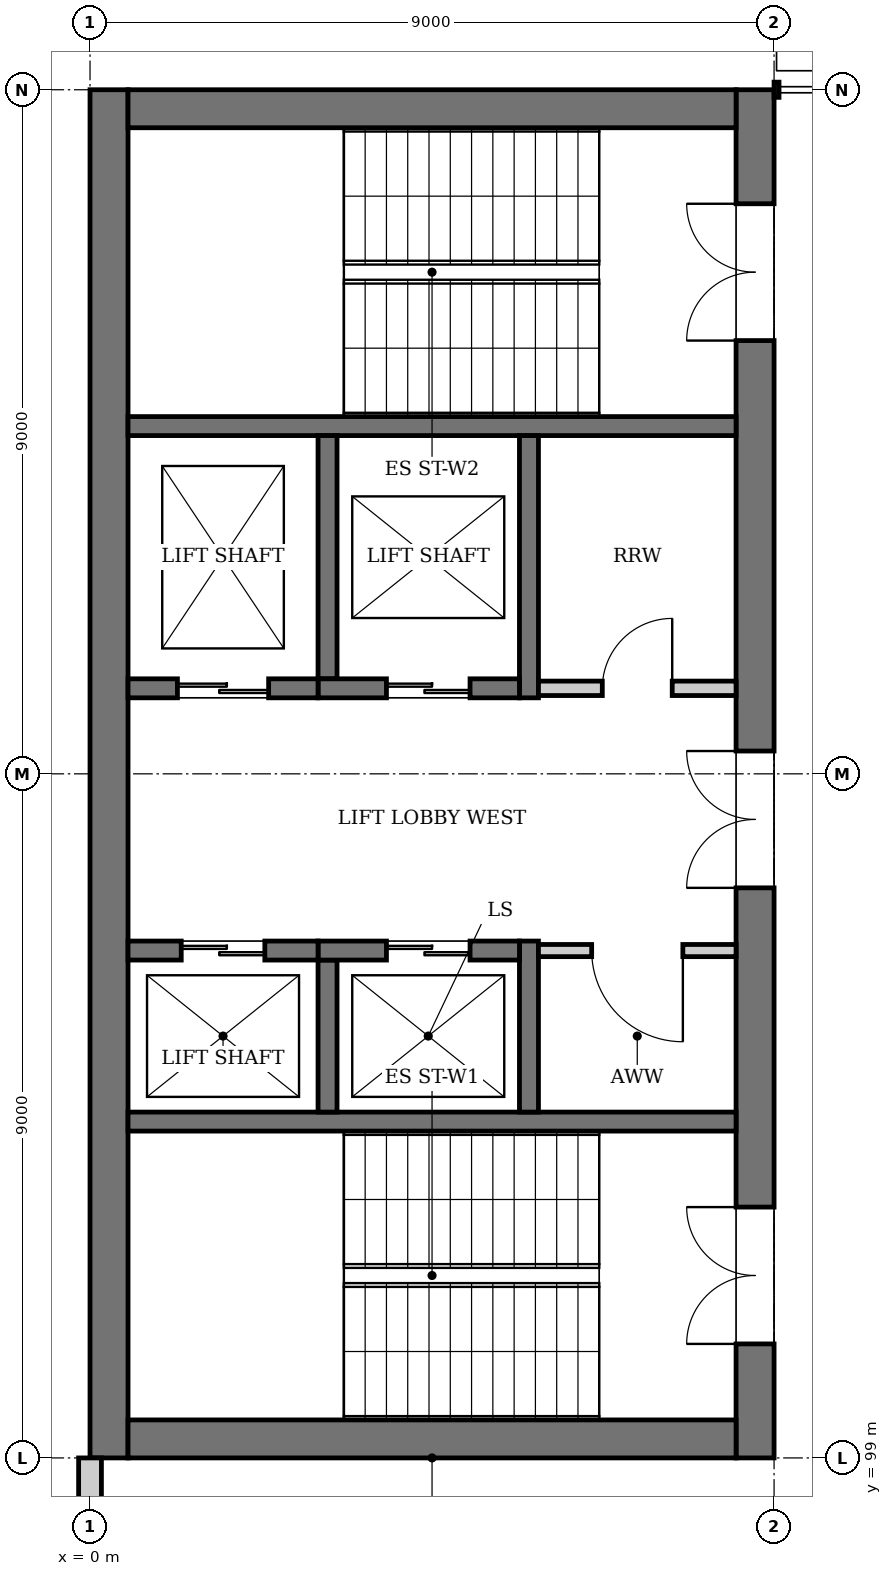
"""IFC4 building model, lengths in metres.
Left out: names, types, materials, properties, quantities, classifications, styles, units other than length and angle.
Written with IfcOpenShell. Run it as: python <this file> out.ifc"""

import sys

from ifc_helpers import new_model, si_unit, direction, frame, frame_2d, origin, place, context, subcontext, project, spatial, rectangle, extrude, element, fill, save


model = new_model("IFC4")
c1 = context("Model", 3, precision=1e-05, world=origin(), true_north=direction((0.0, 1.0)))
c2 = subcontext(c1, "Body", "Model", "MODEL_VIEW")
j1 = project(units=[si_unit("LENGTHUNIT", "METRE"), si_unit("PLANEANGLEUNIT", "RADIAN")], contexts=[c1])
p1 = place(None, origin())
s1 = spatial("IfcSite", under=j1, at=p1, CompositionType="ELEMENT")
p2 = place(p1, origin())
s2 = spatial("IfcBuilding", under=s1, at=p2, CompositionType="ELEMENT")
p3 = place(p2, frame((0.0, 0.0, 6.0)))
s3 = spatial("IfcBuildingStorey", under=s2, at=p3, CompositionType="ELEMENT", Elevation=6.0)
p4 = place(p3, frame((0.25, 99.0, 0.0), z_axis=(0.0, 0.0, 1.0), x_axis=(0.0, 1.0, 0.0)))
e1 = element("IfcWall", 1, at=p4, inside=s3, PredefinedType="SHEAR", context=c2, shape_type="SweptSolid", body=[
    extrude(rectangle(XDim=18.0, YDim=0.5, at=frame_2d((9.0, 0.0))), origin(), (0.0, 0.0, 1.0), 4.5),
])
p5 = place(p3, frame((8.75, 99.0, 0.0), z_axis=(0.0, 0.0, 1.0), x_axis=(0.0, 1.0, 0.0)))
e2 = element("IfcWall", 2, at=p5, inside=s3, PredefinedType="SHEAR", context=c2, shape_type="SweptSolid", body=[
    extrude(rectangle(XDim=18.0, YDim=0.5, at=frame_2d((9.0, 0.0))), origin(), (0.0, 0.0, 1.0), 4.5),
])
p6 = place(p5, frame((1.5, 0.0, 0.0)))
e3 = element("IfcOpeningElement", 3, at=p6, cuts=e2, PredefinedType="OPENING", context=c2, shape_type="SweptSolid", body=[
    extrude(rectangle(XDim=1.8, YDim=2.1, at=frame_2d((0.9, 1.05))), frame((0.0, 0.26, 0.0), z_axis=(0.0, -1.0, 0.0), x_axis=(1.0, 0.0, 0.0)), (0.0, 0.0, 1.0), 0.52),
])
p7 = place(p5, frame((14.7, 0.0, 0.0)))
e4 = element("IfcOpeningElement", 4, at=p7, cuts=e2, PredefinedType="OPENING", context=c2, shape_type="SweptSolid", body=[
    extrude(rectangle(XDim=1.8, YDim=2.1, at=frame_2d((0.9, 1.05))), frame((0.0, 0.26, 0.0), z_axis=(0.0, -1.0, 0.0), x_axis=(1.0, 0.0, 0.0)), (0.0, 0.0, 1.0), 0.52),
])
p8 = place(p5, frame((7.5, 0.0, 0.0)))
e5 = element("IfcOpeningElement", 5, at=p8, cuts=e2, PredefinedType="OPENING", context=c2, shape_type="SweptSolid", body=[
    extrude(rectangle(XDim=1.8, YDim=2.1, at=frame_2d((0.9, 1.05))), frame((0.0, 0.26, 0.0), z_axis=(0.0, -1.0, 0.0), x_axis=(1.0, 0.0, 0.0)), (0.0, 0.0, 1.0), 0.52),
])
for number, where, z_axis, x_axis in (
    (6, (0.5, 99.25, 0.0), (0.0, 0.0, 1.0), (1.0, 0.0, 0.0)),
    (7, (0.5, 116.75, 0.0), (0.0, 0.0, 1.0), (1.0, 0.0, 0.0)),
):
    element("IfcWall", number, at=place(p3, frame(where, z_axis=z_axis, x_axis=x_axis)), inside=s3, PredefinedType="SHEAR", context=c2, shape_type="SweptSolid", body=[
        extrude(rectangle(XDim=8.0, YDim=0.5, at=frame_2d((4.0, 0.0))), origin(), (0.0, 0.0, 1.0), 4.5),
    ])
p9 = place(p3, frame((0.0, 90.128, 0.0), z_axis=(0.0, 0.0, 1.0), x_axis=(0.0, 1.0, 0.0)))
e8 = element("IfcWall", 8, at=p9, inside=s3, PredefinedType="SOLIDWALL", context=c2, shape_type="SweptSolid", body=[
    extrude(rectangle(XDim=8.872, YDim=0.3, at=frame_2d((4.436, 0.0))), origin(), (0.0, 0.0, 1.0), 3.947),
])
p10 = place(p9, frame((0.922, 0.0, 0.9)))
e9 = element("IfcOpeningElement", 9, at=p10, cuts=e8, PredefinedType="OPENING", context=c2, shape_type="SweptSolid", body=[
    extrude(rectangle(XDim=2.4, YDim=2.1, at=frame_2d((1.2, 1.05))), frame((0.0, 0.16, 0.0), z_axis=(0.0, -1.0, 0.0), x_axis=(1.0, 0.0, 0.0)), (0.0, 0.0, 1.0), 0.32),
])
p11 = place(p9, frame((6.172, 0.0, 0.6)))
e10 = element("IfcOpeningElement", 10, at=p11, cuts=e8, PredefinedType="OPENING", context=c2, shape_type="SweptSolid", body=[
    extrude(rectangle(XDim=0.9, YDim=2.7, at=frame_2d((0.45, 1.35))), frame((0.0, 0.16, 0.0), z_axis=(0.0, -1.0, 0.0), x_axis=(1.0, 0.0, 0.0)), (0.0, 0.0, 1.0), 0.32),
])
for number, where, z_axis, x_axis in (
    (11, (8.5, 103.425, 0.0), (0.0, 0.0, 1.0), (-1.0, 0.0, 0.0)),
    (12, (8.5, 112.575, 0.0), (0.0, 0.0, 1.0), (-1.0, 0.0, 0.0)),
):
    element("IfcWall", number, at=place(p3, frame(where, z_axis=z_axis, x_axis=x_axis)), inside=s3, PredefinedType="SOLIDWALL", context=c2, shape_type="SweptSolid", body=[
        extrude(rectangle(XDim=8.0, YDim=0.25, at=frame_2d((4.0, 0.0))), origin(), (0.0, 0.0, 1.0), 4.25),
    ])
p12 = place(p3, frame((5.775, 103.55, 0.0), z_axis=(0.0, 0.0, 1.0), x_axis=(0.0, 1.0, 0.0)))
e13 = element("IfcWall", 13, at=p12, inside=s3, PredefinedType="SOLIDWALL", context=c2, shape_type="SweptSolid", body=[
    extrude(rectangle(XDim=2.25, YDim=0.25, at=frame_2d((1.125, 0.0))), origin(), (0.0, 0.0, 1.0), 4.5),
])
p13 = place(p3, frame((3.125, 103.55, 0.0), z_axis=(0.0, 0.0, 1.0), x_axis=(0.0, 1.0, 0.0)))
e14 = element("IfcWall", 14, at=p13, inside=s3, PredefinedType="SOLIDWALL", context=c2, shape_type="SweptSolid", body=[
    extrude(rectangle(XDim=2.0, YDim=0.25, at=frame_2d((1.0, 0.0))), origin(), (0.0, 0.0, 1.0), 4.5),
])
p14 = place(p3, frame((5.65, 105.675, 0.0), z_axis=(0.0, 0.0, 1.0), x_axis=(-1.0, 0.0, 0.0)))
e15 = element("IfcWall", 15, at=p14, inside=s3, PredefinedType="SOLIDWALL", context=c2, shape_type="SweptSolid", body=[
    extrude(rectangle(XDim=2.65, YDim=0.25, at=frame_2d((1.325, 0.0))), origin(), (0.0, 0.0, 1.0), 4.5),
])
p15 = place(p14, frame((0.65, 0.0, 0.0)))
e16 = element("IfcOpeningElement", 16, at=p15, cuts=e15, PredefinedType="OPENING", context=c2, shape_type="SweptSolid", body=[
    extrude(rectangle(XDim=1.1, YDim=2.1, at=frame_2d((0.55, 1.05))), frame((0.0, 0.135, 0.0), z_axis=(0.0, -1.0, 0.0), x_axis=(1.0, 0.0, 0.0)), (0.0, 0.0, 1.0), 0.27),
])
p16 = place(p3, frame((3.0, 105.675, 0.0), z_axis=(0.0, 0.0, 1.0), x_axis=(-1.0, 0.0, 0.0)))
e17 = element("IfcWall", 17, at=p16, inside=s3, PredefinedType="SOLIDWALL", context=c2, shape_type="SweptSolid", body=[
    extrude(rectangle(XDim=2.5, YDim=0.25, at=frame_2d((1.25, 0.0))), origin(), (0.0, 0.0, 1.0), 4.5),
])
p17 = place(p16, frame((0.7, 0.0, 0.0)))
e18 = element("IfcOpeningElement", 18, at=p17, cuts=e17, PredefinedType="OPENING", context=c2, shape_type="SweptSolid", body=[
    extrude(rectangle(XDim=1.1, YDim=2.1, at=frame_2d((0.55, 1.05))), frame((0.0, 0.135, 0.0), z_axis=(0.0, -1.0, 0.0), x_axis=(1.0, 0.0, 0.0)), (0.0, 0.0, 1.0), 0.27),
])
p18 = place(p3, frame((5.775, 109.0, 0.0), z_axis=(0.0, 0.0, 1.0), x_axis=(0.0, 1.0, 0.0)))
e19 = element("IfcWall", 19, at=p18, inside=s3, PredefinedType="SOLIDWALL", context=c2, shape_type="SweptSolid", body=[
    extrude(rectangle(XDim=3.45, YDim=0.25, at=frame_2d((1.725, 0.0))), origin(), (0.0, 0.0, 1.0), 4.5),
])
p19 = place(p3, frame((3.125, 109.25, 0.0), z_axis=(0.0, 0.0, 1.0), x_axis=(0.0, 1.0, 0.0)))
e20 = element("IfcWall", 20, at=p19, inside=s3, PredefinedType="SOLIDWALL", context=c2, shape_type="SweptSolid", body=[
    extrude(rectangle(XDim=3.2, YDim=0.25, at=frame_2d((1.6, 0.0))), origin(), (0.0, 0.0, 1.0), 4.5),
])
p20 = place(p3, frame((5.65, 109.125, 0.0), z_axis=(0.0, 0.0, 1.0), x_axis=(-1.0, 0.0, 0.0)))
e21 = element("IfcWall", 21, at=p20, inside=s3, PredefinedType="SOLIDWALL", context=c2, shape_type="SweptSolid", body=[
    extrude(rectangle(XDim=2.65, YDim=0.25, at=frame_2d((1.325, 0.0))), origin(), (0.0, 0.0, 1.0), 4.5),
])
p21 = place(p20, frame((0.65, 0.0, 0.0)))
e22 = element("IfcOpeningElement", 22, at=p21, cuts=e21, PredefinedType="OPENING", context=c2, shape_type="SweptSolid", body=[
    extrude(rectangle(XDim=1.1, YDim=2.1, at=frame_2d((0.55, 1.05))), frame((0.0, 0.135, 0.0), z_axis=(0.0, -1.0, 0.0), x_axis=(1.0, 0.0, 0.0)), (0.0, 0.0, 1.0), 0.27),
])
p22 = place(p3, frame((3.0, 109.125, 0.0), z_axis=(0.0, 0.0, 1.0), x_axis=(-1.0, 0.0, 0.0)))
e23 = element("IfcWall", 23, at=p22, inside=s3, PredefinedType="SOLIDWALL", context=c2, shape_type="SweptSolid", body=[
    extrude(rectangle(XDim=2.5, YDim=0.25, at=frame_2d((1.25, 0.0))), origin(), (0.0, 0.0, 1.0), 4.5),
])
p23 = place(p22, frame((0.65, 0.0, 0.0)))
e24 = element("IfcOpeningElement", 24, at=p23, cuts=e23, PredefinedType="OPENING", context=c2, shape_type="SweptSolid", body=[
    extrude(rectangle(XDim=1.2, YDim=2.1, at=frame_2d((0.6, 1.05))), frame((0.0, 0.135, 0.0), z_axis=(0.0, -1.0, 0.0), x_axis=(1.0, 0.0, 0.0)), (0.0, 0.0, 1.0), 0.27),
])
p24 = place(p3, frame((8.5, 105.675, 0.0), z_axis=(0.0, 0.0, 1.0), x_axis=(-1.0, 0.0, 0.0)))
e25 = element("IfcWall", 25, at=p24, inside=s3, PredefinedType="PARTITIONING", context=c2, shape_type="SweptSolid", body=[
    extrude(rectangle(XDim=2.6, YDim=0.16, at=frame_2d((1.3, 0.0))), origin(), (0.0, 0.0, 1.0), 4.25),
])
p25 = place(p24, frame((0.7, 0.0, 0.0)))
e26 = element("IfcOpeningElement", 26, at=p25, cuts=e25, PredefinedType="OPENING", context=c2, shape_type="SweptSolid", body=[
    extrude(rectangle(XDim=1.2, YDim=2.1, at=frame_2d((0.6, 1.05))), frame((0.0, 0.09, 0.0), z_axis=(0.0, -1.0, 0.0), x_axis=(1.0, 0.0, 0.0)), (0.0, 0.0, 1.0), 0.18),
])
p26 = place(p3, frame((8.5, 109.125, 0.0), z_axis=(0.0, 0.0, 1.0), x_axis=(-1.0, 0.0, 0.0)))
e27 = element("IfcWall", 27, at=p26, inside=s3, PredefinedType="PARTITIONING", context=c2, shape_type="SweptSolid", body=[
    extrude(rectangle(XDim=2.6, YDim=0.19, at=frame_2d((1.3, 0.0))), origin(), (0.0, 0.0, 1.0), 4.25),
])
p27 = place(p26, frame((0.84, 0.0, 0.0)))
e28 = element("IfcOpeningElement", 28, at=p27, cuts=e27, PredefinedType="OPENING", context=c2, shape_type="SweptSolid", body=[
    extrude(rectangle(XDim=0.92, YDim=2.1, at=frame_2d((0.46, 1.05))), frame((0.0, 0.105, 0.0), z_axis=(0.0, -1.0, 0.0), x_axis=(1.0, 0.0, 0.0)), (0.0, 0.0, 1.0), 0.21),
])
p28 = place(p15, origin())
e29 = element("IfcDoor", 29, at=p28, inside=s3, OperationType="DOUBLE_DOOR_SLIDING", PredefinedType="DOOR", context=c2, shape_type="SweptSolid", body=[
    extrude(rectangle(XDim=1.1, YDim=2.1, at=frame_2d((0.55, 1.05))), frame((0.0, 0.025, 0.0), z_axis=(0.0, -1.0, 0.0), x_axis=(1.0, 0.0, 0.0)), (0.0, 0.0, 1.0), 0.05),
])
fill(e16, e29)
p29 = place(p17, origin())
e30 = element("IfcDoor", 30, at=p29, inside=s3, OperationType="DOUBLE_DOOR_SLIDING", PredefinedType="DOOR", context=c2, shape_type="SweptSolid", body=[
    extrude(rectangle(XDim=1.1, YDim=2.1, at=frame_2d((0.55, 1.05))), frame((0.0, 0.025, 0.0), z_axis=(0.0, -1.0, 0.0), x_axis=(1.0, 0.0, 0.0)), (0.0, 0.0, 1.0), 0.05),
])
fill(e18, e30)
p30 = place(p21, origin())
e31 = element("IfcDoor", 31, at=p30, inside=s3, OperationType="DOUBLE_DOOR_SLIDING", PredefinedType="DOOR", context=c2, shape_type="SweptSolid", body=[
    extrude(rectangle(XDim=1.1, YDim=2.1, at=frame_2d((0.55, 1.05))), frame((0.0, 0.025, 0.0), z_axis=(0.0, -1.0, 0.0), x_axis=(1.0, 0.0, 0.0)), (0.0, 0.0, 1.0), 0.05),
])
fill(e22, e31)
p31 = place(p23, origin())
e32 = element("IfcDoor", 32, at=p31, inside=s3, OperationType="DOUBLE_DOOR_SLIDING", PredefinedType="DOOR", context=c2, shape_type="SweptSolid", body=[
    extrude(rectangle(XDim=1.2, YDim=2.1, at=frame_2d((0.6, 1.05))), frame((0.0, 0.025, 0.0), z_axis=(0.0, -1.0, 0.0), x_axis=(1.0, 0.0, 0.0)), (0.0, 0.0, 1.0), 0.05),
])
fill(e24, e32)
p32 = place(p6, origin())
e33 = element("IfcDoor", 33, at=p32, inside=s3, OperationType="DOUBLE_DOOR_SINGLE_SWING", PredefinedType="DOOR", context=c2, shape_type="SweptSolid", body=[
    extrude(rectangle(XDim=1.8, YDim=2.1, at=frame_2d((0.9, 1.05))), frame((0.0, 0.025, 0.0), z_axis=(0.0, -1.0, 0.0), x_axis=(1.0, 0.0, 0.0)), (0.0, 0.0, 1.0), 0.05),
])
fill(e3, e33)
p33 = place(p7, origin())
e34 = element("IfcDoor", 34, at=p33, inside=s3, OperationType="DOUBLE_DOOR_SINGLE_SWING", PredefinedType="DOOR", context=c2, shape_type="SweptSolid", body=[
    extrude(rectangle(XDim=1.8, YDim=2.1, at=frame_2d((0.9, 1.05))), frame((0.0, 0.025, 0.0), z_axis=(0.0, -1.0, 0.0), x_axis=(1.0, 0.0, 0.0)), (0.0, 0.0, 1.0), 0.05),
])
fill(e4, e34)
p34 = place(p8, origin())
e35 = element("IfcDoor", 35, at=p34, inside=s3, OperationType="DOUBLE_DOOR_SINGLE_SWING", PredefinedType="DOOR", context=c2, shape_type="SweptSolid", body=[
    extrude(rectangle(XDim=1.8, YDim=2.1, at=frame_2d((0.9, 1.05))), frame((0.0, 0.025, 0.0), z_axis=(0.0, -1.0, 0.0), x_axis=(1.0, 0.0, 0.0)), (0.0, 0.0, 1.0), 0.05),
])
fill(e5, e35)
p35 = place(p25, origin())
e36 = element("IfcDoor", 36, at=p35, inside=s3, OperationType="SINGLE_SWING_LEFT", PredefinedType="DOOR", context=c2, shape_type="SweptSolid", body=[
    extrude(rectangle(XDim=1.2, YDim=2.1, at=frame_2d((0.6, 1.05))), frame((0.0, 0.025, 0.0), z_axis=(0.0, -1.0, 0.0), x_axis=(1.0, 0.0, 0.0)), (0.0, 0.0, 1.0), 0.05),
])
fill(e26, e36)
p36 = place(p27, frame((0.92, 0.0, 0.0), z_axis=(0.0, 0.0, 1.0), x_axis=(-1.0, 0.0, 0.0)))
e37 = element("IfcDoor", 37, at=p36, inside=s3, OperationType="SINGLE_SWING_RIGHT", PredefinedType="DOOR", context=c2, shape_type="SweptSolid", body=[
    extrude(rectangle(XDim=0.92, YDim=2.1, at=frame_2d((0.46, 1.05))), frame((0.0, 0.025, 0.0), z_axis=(0.0, -1.0, 0.0), x_axis=(1.0, 0.0, 0.0)), (0.0, 0.0, 1.0), 0.05),
])
fill(e28, e37)
save(model, sys.argv[1])
